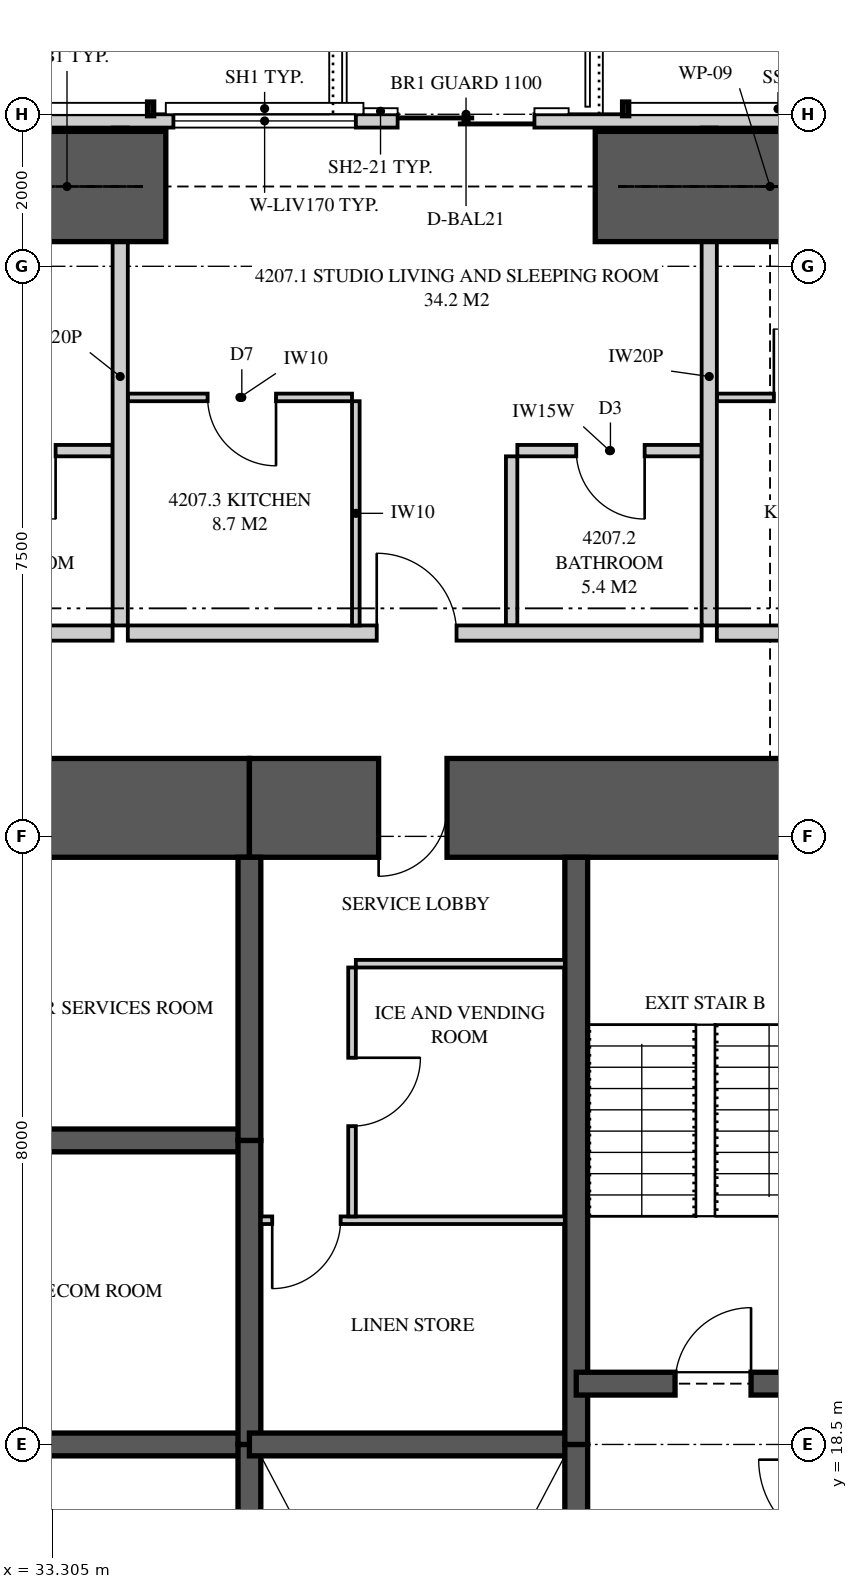
"""IFC4 building model, lengths in metres.
Left out: names, types, materials, properties, quantities, classifications, styles, units other than length and angle.
Written with IfcOpenShell. Run it as: python <this file> out.ifc"""

import sys

from ifc_helpers import new_model, si_unit, direction, frame, frame_2d, origin, place, context, subcontext, project, spatial, polyline, rectangle, outline, extrude, element, fill, save


model = new_model("IFC4")
c1 = context("Model", 3, precision=1e-05, world=origin(), true_north=direction((0.0, 1.0)))
c2 = subcontext(c1, "Body", "Model", "MODEL_VIEW")
j1 = project(units=[si_unit("LENGTHUNIT", "METRE"), si_unit("PLANEANGLEUNIT", "RADIAN")], contexts=[c1])
p1 = place(None, origin())
s1 = spatial("IfcSite", under=j1, at=p1, CompositionType="ELEMENT")
p2 = place(p1, origin())
s2 = spatial("IfcBuilding", under=s1, at=p2, CompositionType="ELEMENT")
p3 = place(p2, frame((0.0, 0.0, 157.7)))
s3 = spatial("IfcBuildingStorey", under=s2, at=p3, CompositionType="ELEMENT", Elevation=157.7)
p4 = place(p3, frame((44.15, 26.875, 0.0), z_axis=(0.0, 0.0, 1.0), x_axis=(-1.0, 0.0, 0.0)))
e1 = element("IfcWall", 1, at=p4, inside=s3, PredefinedType="SHEAR", context=c2, shape_type="SweptSolid", body=[
    extrude(rectangle(XDim=8.25, YDim=1.3, at=frame_2d((4.125, 0.0))), origin(), (0.0, 0.0, 1.0), 3.35),
])
p5 = place(p4, frame((5.65, 0.0, 0.0)))
e2 = element("IfcOpeningElement", 2, at=p5, cuts=e1, PredefinedType="OPENING", context=c2, shape_type="SweptSolid", body=[
    extrude(rectangle(XDim=0.9, YDim=2.1, at=frame_2d((0.45, 1.05))), frame((0.0, 0.66, 0.0), z_axis=(0.0, -1.0, 0.0), x_axis=(1.0, 0.0, 0.0)), (0.0, 0.0, 1.0), 1.32),
])
p6 = place(p3, frame((35.9, 26.875, 0.0), z_axis=(0.0, 0.0, 1.0), x_axis=(-1.0, 0.0, 0.0)))
e3 = element("IfcWall", 3, at=p6, inside=s3, PredefinedType="SHEAR", context=c2, shape_type="SweptSolid", body=[
    extrude(rectangle(XDim=4.3, YDim=1.3, at=frame_2d((2.15, 0.0))), origin(), (0.0, 0.0, 1.0), 3.35),
])
for number, where, z_axis, x_axis in (
    (4, (35.9, 14.5, 0.0), (0.0, 0.0, 1.0), (0.0, 1.0, 0.0)),
    (5, (35.9, 18.5, 0.0), (0.0, 0.0, 1.0), (0.0, 1.0, 0.0)),
):
    element("IfcWall", number, at=place(p3, frame(where, z_axis=z_axis, x_axis=x_axis)), inside=s3, PredefinedType="SHEAR", context=c2, shape_type="SweptSolid", body=[
        extrude(rectangle(XDim=4.0, YDim=0.3, at=frame_2d((2.0, 0.0))), origin(), (0.0, 0.0, 1.0), 3.35),
    ])
p7 = place(p3, frame((35.9, 22.5, 0.0), z_axis=(0.0, 0.0, 1.0), x_axis=(0.0, 1.0, 0.0)))
e6 = element("IfcWall", 6, at=p7, inside=s3, PredefinedType="SHEAR", context=c2, shape_type="SweptSolid", body=[
    extrude(rectangle(XDim=3.725, YDim=0.3, at=frame_2d((1.863, 0.0))), origin(), (0.0, 0.0, 1.0), 3.35),
])
p8 = place(p3, frame((40.2, 13.7, 0.0), z_axis=(0.0, 0.0, 1.0), x_axis=(0.0, 1.0, 0.0)))
e7 = element("IfcWall", 7, at=p8, inside=s3, PredefinedType="SHEAR", context=c2, shape_type="SweptSolid", body=[
    extrude(rectangle(XDim=4.8, YDim=0.3, at=frame_2d((2.4, 0.0))), origin(), (0.0, 0.0, 1.0), 3.35),
])
p9 = place(p3, frame((40.2, 18.5, 0.0), z_axis=(0.0, 0.0, 1.0), x_axis=(0.0, 1.0, 0.0)))
e8 = element("IfcWall", 8, at=p9, inside=s3, PredefinedType="SHEAR", context=c2, shape_type="SweptSolid", body=[
    extrude(rectangle(XDim=7.725, YDim=0.3, at=frame_2d((3.863, 0.0))), origin(), (0.0, 0.0, 1.0), 3.35),
])
for number, where, z_axis, x_axis in (
    (9, (31.6, 18.5, 0.0), (0.0, 0.0, 1.0), (1.0, 0.0, 0.0)),
    (10, (31.6, 22.5, 0.0), (0.0, 0.0, 1.0), (1.0, 0.0, 0.0)),
):
    element("IfcWall", number, at=place(p3, frame(where, z_axis=z_axis, x_axis=x_axis)), inside=s3, PredefinedType="SHEAR", context=c2, shape_type="SweptSolid", body=[
        extrude(rectangle(XDim=4.3, YDim=0.3, at=frame_2d((2.15, 0.0))), origin(), (0.0, 0.0, 1.0), 3.35),
    ])
p10 = place(p3, frame((35.9, 18.5, 0.0), z_axis=(0.0, 0.0, 1.0), x_axis=(1.0, 0.0, 0.0)))
e11 = element("IfcWall", 11, at=p10, inside=s3, PredefinedType="SHEAR", context=c2, shape_type="SweptSolid", body=[
    extrude(rectangle(XDim=4.3, YDim=0.3, at=frame_2d((2.15, 0.0))), origin(), (0.0, 0.0, 1.0), 3.35),
])
p11 = place(p3, frame((40.2, 19.3, 0.0), z_axis=(0.0, 0.0, 1.0), x_axis=(1.0, 0.0, 0.0)))
e12 = element("IfcWall", 12, at=p11, inside=s3, PredefinedType="SHEAR", context=c2, shape_type="SweptSolid", body=[
    extrude(rectangle(XDim=3.6, YDim=0.3, at=frame_2d((1.8, 0.0))), origin(), (0.0, 0.0, 1.0), 3.35),
])
p12 = place(p11, frame((1.3, 0.0, 0.0)))
e13 = element("IfcOpeningElement", 13, at=p12, cuts=e12, PredefinedType="OPENING", context=c2, shape_type="SweptSolid", body=[
    extrude(rectangle(XDim=1.0, YDim=2.1, at=frame_2d((0.5, 1.05))), frame((0.0, 0.16, 0.0), z_axis=(0.0, -1.0, 0.0), x_axis=(1.0, 0.0, 0.0)), (0.0, 0.0, 1.0), 0.32),
])
p13 = place(p3, frame((49.949, 35.913, 0.0), z_axis=(0.0, 0.0, 1.0), x_axis=(-1.0, 0.0, 0.0)))
e14 = element("IfcWall", 14, at=p13, inside=s3, PredefinedType="SOLIDWALL", context=c2, shape_type="SweptSolid", body=[
    extrude(outline(polyline([(0.0, 0.0), (34.897, 0.0), (34.897, 3.11), (27.91, 3.11), (27.91, 2.15), (27.836, 2.15), (27.836, 3.11), (27.699, 3.11), (27.699, 2.15), (7.199, 2.15), (7.199, 3.11), (7.062, 3.11), (7.062, 2.15), (6.987, 2.15), (6.987, 3.11), (0.0, 3.11), (0.0, 0.0)])), frame((0.0, 0.087, 0.0), z_axis=(0.0, -1.0, 0.0), x_axis=(1.0, 0.0, 0.0)), (0.0, 0.0, 1.0), 0.175),
])
p14 = place(p13, frame((2.389, 0.0, 0.4)))
e15 = element("IfcOpeningElement", 15, at=p14, cuts=e14, PredefinedType="OPENING", context=c2, shape_type="SweptSolid", body=[
    extrude(rectangle(XDim=2.4, YDim=1.7, at=frame_2d((1.2, 0.85))), frame((0.0, 0.097, 0.0), z_axis=(0.0, -1.0, 0.0), x_axis=(1.0, 0.0, 0.0)), (0.0, 0.0, 1.0), 0.195),
])
p15 = place(p13, frame((10.299, 0.0, 0.0)))
e16 = element("IfcOpeningElement", 16, at=p15, cuts=e14, PredefinedType="OPENING", context=c2, shape_type="SweptSolid", body=[
    extrude(rectangle(XDim=1.8, YDim=2.1, at=frame_2d((0.9, 1.05))), frame((0.0, 0.097, 0.0), z_axis=(0.0, -1.0, 0.0), x_axis=(1.0, 0.0, 0.0)), (0.0, 0.0, 1.0), 0.195),
])
p16 = place(p13, frame((12.649, 0.0, 0.4)))
e17 = element("IfcOpeningElement", 17, at=p16, cuts=e14, PredefinedType="OPENING", context=c2, shape_type="SweptSolid", body=[
    extrude(rectangle(XDim=2.4, YDim=1.7, at=frame_2d((1.2, 0.85))), frame((0.0, 0.097, 0.0), z_axis=(0.0, -1.0, 0.0), x_axis=(1.0, 0.0, 0.0)), (0.0, 0.0, 1.0), 0.195),
])
p17 = place(p13, frame((22.699, 0.0, 0.0)))
e18 = element("IfcOpeningElement", 18, at=p17, cuts=e14, PredefinedType="OPENING", context=c2, shape_type="SweptSolid", body=[
    extrude(rectangle(XDim=1.8, YDim=2.1, at=frame_2d((0.9, 1.05))), frame((0.0, 0.097, 0.0), z_axis=(0.0, -1.0, 0.0), x_axis=(1.0, 0.0, 0.0)), (0.0, 0.0, 1.0), 0.195),
])
p18 = place(p13, frame((19.849, 0.0, 0.4)))
e19 = element("IfcOpeningElement", 19, at=p18, cuts=e14, PredefinedType="OPENING", context=c2, shape_type="SweptSolid", body=[
    extrude(rectangle(XDim=2.4, YDim=1.7, at=frame_2d((1.2, 0.85))), frame((0.0, 0.097, 0.0), z_axis=(0.0, -1.0, 0.0), x_axis=(1.0, 0.0, 0.0)), (0.0, 0.0, 1.0), 0.195),
])
p19 = place(p13, frame((30.973, 0.0, 0.4)))
e20 = element("IfcOpeningElement", 20, at=p19, cuts=e14, PredefinedType="OPENING", context=c2, shape_type="SweptSolid", body=[
    extrude(rectangle(XDim=2.4, YDim=1.7, at=frame_2d((1.2, 0.85))), frame((0.0, 0.097, 0.0), z_axis=(0.0, -1.0, 0.0), x_axis=(1.0, 0.0, 0.0)), (0.0, 0.0, 1.0), 0.195),
])
p20 = place(p3, frame((34.2, 35.825, 0.0), z_axis=(0.0, 0.0, 1.0), x_axis=(0.0, -1.0, 0.0)))
e21 = element("IfcWall", 21, at=p20, inside=s3, PredefinedType="PARTITIONING", context=c2, shape_type="SweptSolid", body=[
    extrude(outline(polyline([(0.529, 2.15), (0.0, 2.15), (0.0, 0.0), (0.529, 0.0), (0.529, 0.123), (1.021, 0.123), (1.021, 0.0), (6.55, 0.0), (6.55, 3.11), (1.685, 3.11), (1.685, 2.15), (1.021, 2.15), (1.021, 2.027), (0.529, 2.027), (0.529, 2.15)])), frame((0.0, 0.1, 0.0), z_axis=(0.0, -1.0, 0.0), x_axis=(1.0, 0.0, 0.0)), (0.0, 0.0, 1.0), 0.2),
])
p21 = place(p3, frame((31.675, 31.575, 0.0), z_axis=(0.0, 0.0, 1.0), x_axis=(1.0, 0.0, 0.0)))
e22 = element("IfcWall", 22, at=p21, inside=s3, PredefinedType="PLUMBINGWALL", context=c2, shape_type="SweptSolid", body=[
    extrude(outline(polyline([(0.0, 0.0), (2.425, 0.0), (2.425, 3.11), (1.146, 3.11), (1.146, 2.531), (0.504, 2.531), (0.504, 3.11), (0.0, 3.11), (0.0, 0.0)])), frame((0.0, 0.075, 0.0), z_axis=(0.0, -1.0, 0.0), x_axis=(1.0, 0.0, 0.0)), (0.0, 0.0, 1.0), 0.15),
])
p22 = place(p21, frame((0.775, 0.0, 0.0)))
e23 = element("IfcOpeningElement", 23, at=p22, cuts=e22, PredefinedType="OPENING", context=c2, shape_type="SweptSolid", body=[
    extrude(rectangle(XDim=0.9, YDim=2.1, at=frame_2d((0.45, 1.05))), frame((0.0, 0.085, 0.0), z_axis=(0.0, -1.0, 0.0), x_axis=(1.0, 0.0, 0.0)), (0.0, 0.0, 1.0), 0.17),
])
p23 = place(p3, frame((41.95, 35.825, 0.0), z_axis=(0.0, 0.0, 1.0), x_axis=(0.0, -1.0, 0.0)))
e24 = element("IfcWall", 24, at=p23, inside=s3, PredefinedType="PARTITIONING", context=c2, shape_type="SweptSolid", body=[
    extrude(outline(polyline([(0.529, 2.15), (0.0, 2.15), (0.0, 0.0), (0.529, 0.0), (0.529, 0.876), (1.021, 0.876), (1.021, 0.0), (6.55, 0.0), (6.55, 3.11), (1.685, 3.11), (1.685, 2.15), (1.021, 2.15), (1.021, 1.274), (0.529, 1.274), (0.529, 2.15)])), frame((0.0, 0.1, 0.0), z_axis=(0.0, -1.0, 0.0), x_axis=(1.0, 0.0, 0.0)), (0.0, 0.0, 1.0), 0.2),
])
p24 = place(p3, frame((34.3, 29.175, 0.0), z_axis=(0.0, 0.0, 1.0), x_axis=(1.0, 0.0, 0.0)))
e25 = element("IfcWall", 25, at=p24, inside=s3, PredefinedType="PARTITIONING", context=c2, shape_type="SweptSolid", body=[
    extrude(rectangle(XDim=7.55, YDim=0.2, at=frame_2d((3.775, 0.0))), origin(), (0.0, 0.0, 1.0), 3.11),
])
p25 = place(p24, frame((3.275, 0.0, 0.0)))
e26 = element("IfcOpeningElement", 26, at=p25, cuts=e25, PredefinedType="OPENING", context=c2, shape_type="SweptSolid", body=[
    extrude(rectangle(XDim=1.05, YDim=2.2, at=frame_2d((0.525, 1.1))), frame((0.0, 0.11, 0.0), z_axis=(0.0, -1.0, 0.0), x_axis=(1.0, 0.0, 0.0)), (0.0, 0.0, 1.0), 0.22),
])
p26 = place(p3, frame((39.425, 31.575, 0.0), z_axis=(0.0, 0.0, 1.0), x_axis=(1.0, 0.0, 0.0)))
e27 = element("IfcWall", 27, at=p26, inside=s3, PredefinedType="PLUMBINGWALL", context=c2, shape_type="SweptSolid", body=[
    extrude(rectangle(XDim=2.425, YDim=0.15, at=frame_2d((1.212, 0.0))), origin(), (0.0, 0.0, 1.0), 3.11),
])
p27 = place(p26, frame((0.775, 0.0, 0.0)))
e28 = element("IfcOpeningElement", 28, at=p27, cuts=e27, PredefinedType="OPENING", context=c2, shape_type="SweptSolid", body=[
    extrude(rectangle(XDim=0.9, YDim=2.1, at=frame_2d((0.45, 1.05))), frame((0.0, 0.085, 0.0), z_axis=(0.0, -1.0, 0.0), x_axis=(1.0, 0.0, 0.0)), (0.0, 0.0, 1.0), 0.17),
])
p28 = place(p3, frame((39.35, 31.5, 0.0), z_axis=(0.0, 0.0, 1.0), x_axis=(0.0, -1.0, 0.0)))
e29 = element("IfcWall", 29, at=p28, inside=s3, PredefinedType="PLUMBINGWALL", context=c2, shape_type="SweptSolid", body=[
    extrude(rectangle(XDim=2.225, YDim=0.15, at=frame_2d((1.113, 0.0))), origin(), (0.0, 0.0, 1.0), 3.11),
])
p29 = place(p3, frame((34.3, 32.275, 0.0), z_axis=(0.0, 0.0, 1.0), x_axis=(1.0, 0.0, 0.0)))
e30 = element("IfcWall", 30, at=p29, inside=s3, PredefinedType="PARTITIONING", context=c2, shape_type="SweptSolid", body=[
    extrude(rectangle(XDim=2.95, YDim=0.1, at=frame_2d((1.475, 0.0))), origin(), (0.0, 0.0, 1.0), 3.11),
])
p30 = place(p29, frame((1.05, 0.0, 0.0)))
e31 = element("IfcOpeningElement", 31, at=p30, cuts=e30, PredefinedType="OPENING", context=c2, shape_type="SweptSolid", body=[
    extrude(rectangle(XDim=0.9, YDim=2.1, at=frame_2d((0.45, 1.05))), frame((0.0, 0.06, 0.0), z_axis=(0.0, -1.0, 0.0), x_axis=(1.0, 0.0, 0.0)), (0.0, 0.0, 1.0), 0.12),
])
p31 = place(p3, frame((37.3, 32.225, 0.0), z_axis=(0.0, 0.0, 1.0), x_axis=(0.0, -1.0, 0.0)))
e32 = element("IfcWall", 32, at=p31, inside=s3, PredefinedType="PARTITIONING", context=c2, shape_type="SweptSolid", body=[
    extrude(rectangle(XDim=2.95, YDim=0.1, at=frame_2d((1.475, 0.0))), origin(), (0.0, 0.0, 1.0), 3.11),
])
p32 = place(p3, frame((42.05, 29.175, 0.0), z_axis=(0.0, 0.0, 1.0), x_axis=(1.0, 0.0, 0.0)))
e33 = element("IfcWall", 33, at=p32, inside=s3, PredefinedType="PARTITIONING", context=c2, shape_type="SweptSolid", body=[
    extrude(outline(polyline([(0.0, 0.0), (3.9, 0.0), (3.9, 3.11), (1.046, 3.11), (1.046, 2.531), (0.354, 2.531), (0.354, 3.11), (0.0, 3.11), (0.0, 0.0)])), frame((0.0, 0.1, 0.0), z_axis=(0.0, -1.0, 0.0), x_axis=(1.0, 0.0, 0.0)), (0.0, 0.0, 1.0), 0.2),
])
p33 = place(p32, frame((2.7, 0.0, 0.0)))
e34 = element("IfcOpeningElement", 34, at=p33, cuts=e33, PredefinedType="OPENING", context=c2, shape_type="SweptSolid", body=[
    extrude(rectangle(XDim=1.05, YDim=2.2, at=frame_2d((0.525, 1.1))), frame((0.0, 0.11, 0.0), z_axis=(0.0, -1.0, 0.0), x_axis=(1.0, 0.0, 0.0)), (0.0, 0.0, 1.0), 0.22),
])
p34 = place(p3, frame((42.05, 32.275, 0.0), z_axis=(0.0, 0.0, 1.0), x_axis=(1.0, 0.0, 0.0)))
e35 = element("IfcWall", 35, at=p34, inside=s3, PredefinedType="PARTITIONING", context=c2, shape_type="SweptSolid", body=[
    extrude(outline(polyline([(0.0, 0.0), (2.35, 0.0), (2.35, 3.11), (0.996, 3.11), (0.996, 2.531), (0.404, 2.531), (0.404, 3.11), (0.0, 3.11), (0.0, 0.0)])), frame((0.0, 0.05, 0.0), z_axis=(0.0, -1.0, 0.0), x_axis=(1.0, 0.0, 0.0)), (0.0, 0.0, 1.0), 0.1),
])
p35 = place(p34, frame((0.75, 0.0, 0.0)))
e36 = element("IfcOpeningElement", 36, at=p35, cuts=e35, PredefinedType="OPENING", context=c2, shape_type="SweptSolid", body=[
    extrude(rectangle(XDim=0.9, YDim=2.1, at=frame_2d((0.45, 1.05))), frame((0.0, 0.06, 0.0), z_axis=(0.0, -1.0, 0.0), x_axis=(1.0, 0.0, 0.0)), (0.0, 0.0, 1.0), 0.12),
])
p36 = place(p3, frame((28.8, 29.175, 0.0), z_axis=(0.0, 0.0, 1.0), x_axis=(1.0, 0.0, 0.0)))
e37 = element("IfcWall", 37, at=p36, inside=s3, PredefinedType="PARTITIONING", context=c2, shape_type="SweptSolid", body=[
    extrude(outline(polyline([(0.0, 0.0), (5.3, 0.0), (5.3, 3.11), (4.046, 3.11), (4.046, 2.531), (3.354, 2.531), (3.354, 3.11), (0.0, 3.11), (0.0, 0.0)])), frame((0.0, 0.1, 0.0), z_axis=(0.0, -1.0, 0.0), x_axis=(1.0, 0.0, 0.0)), (0.0, 0.0, 1.0), 0.2),
])
p37 = place(p3, frame((37.3, 24.825, 0.0), z_axis=(0.0, 0.0, 1.0), x_axis=(1.0, 0.0, 0.0)))
e38 = element("IfcWall", 38, at=p37, inside=s3, PredefinedType="PARTITIONING", context=c2, shape_type="SweptSolid", body=[
    extrude(rectangle(XDim=2.75, YDim=0.1, at=frame_2d((1.375, 0.0))), origin(), (0.0, 0.0, 1.0), 3.11),
])
p38 = place(p3, frame((37.25, 21.5, 0.0), z_axis=(0.0, 0.0, 1.0), x_axis=(0.0, 1.0, 0.0)))
e39 = element("IfcWall", 39, at=p38, inside=s3, PredefinedType="PARTITIONING", context=c2, shape_type="SweptSolid", body=[
    extrude(rectangle(XDim=3.275, YDim=0.1, at=frame_2d((1.637, 0.0))), origin(), (0.0, 0.0, 1.0), 3.11),
])
p39 = place(p38, frame((1.188, 0.0, 0.0)))
e40 = element("IfcOpeningElement", 40, at=p39, cuts=e39, PredefinedType="OPENING", context=c2, shape_type="SweptSolid", body=[
    extrude(rectangle(XDim=0.9, YDim=2.1, at=frame_2d((0.45, 1.05))), frame((0.0, 0.06, 0.0), z_axis=(0.0, -1.0, 0.0), x_axis=(1.0, 0.0, 0.0)), (0.0, 0.0, 1.0), 0.12),
])
p40 = place(p3, frame((36.05, 21.45, 0.0), z_axis=(0.0, 0.0, 1.0), x_axis=(1.0, 0.0, 0.0)))
e41 = element("IfcWall", 41, at=p40, inside=s3, PredefinedType="PARTITIONING", context=c2, shape_type="SweptSolid", body=[
    extrude(rectangle(XDim=4.0, YDim=0.1, at=frame_2d((2.0, 0.0))), origin(), (0.0, 0.0, 1.0), 3.11),
])
p41 = place(p40, frame((0.15, 0.0, 0.0)))
e42 = element("IfcOpeningElement", 42, at=p41, cuts=e41, PredefinedType="OPENING", context=c2, shape_type="SweptSolid", body=[
    extrude(rectangle(XDim=0.9, YDim=2.1, at=frame_2d((0.45, 1.05))), frame((0.0, 0.06, 0.0), z_axis=(0.0, -1.0, 0.0), x_axis=(1.0, 0.0, 0.0)), (0.0, 0.0, 1.0), 0.12),
])
for number, where, z_axis, x_axis in (
    (43, (40.45, 35.05, 0.0), (0.0, 0.0, 1.0), (1.0, 0.0, 0.0)),
    (44, (30.2, 35.05, 0.0), (0.0, 0.0, 1.0), (1.0, 0.0, 0.0)),
):
    element("IfcWall", number, at=place(p3, frame(where, z_axis=z_axis, x_axis=x_axis)), inside=s3, PredefinedType="SHEAR", context=c2, shape_type="SweptSolid", body=[
        extrude(rectangle(XDim=4.6, YDim=1.45, at=frame_2d((2.3, 0.0))), origin(), (0.0, 0.0, 1.0), 3.35),
    ])
p42 = place(p15, origin())
e45 = element("IfcDoor", 45, at=p42, inside=s3, OperationType="SLIDING_TO_LEFT", PredefinedType="DOOR", context=c2, shape_type="SweptSolid", body=[
    extrude(rectangle(XDim=1.8, YDim=2.1, at=frame_2d((0.9, 1.05))), frame((0.0, 0.025, 0.0), z_axis=(0.0, -1.0, 0.0), x_axis=(1.0, 0.0, 0.0)), (0.0, 0.0, 1.0), 0.05),
])
fill(e16, e45)
p43 = place(p16, origin())
e46 = element("IfcWindow", 46, at=p43, inside=s3, PartitioningType="SINGLE_PANEL", PredefinedType="WINDOW", context=c2, shape_type="SweptSolid", body=[
    extrude(rectangle(XDim=2.4, YDim=1.7, at=frame_2d((1.2, 0.85))), frame((0.0, 0.03, 0.0), z_axis=(0.0, -1.0, 0.0), x_axis=(1.0, 0.0, 0.0)), (0.0, 0.0, 1.0), 0.06),
])
fill(e17, e46)
p44 = place(p22, frame((0.9, 0.0, 0.0), z_axis=(0.0, 0.0, 1.0), x_axis=(-1.0, 0.0, 0.0)))
e47 = element("IfcDoor", 47, at=p44, inside=s3, OperationType="SINGLE_SWING_LEFT", PredefinedType="DOOR", context=c2, shape_type="SweptSolid", body=[
    extrude(rectangle(XDim=0.9, YDim=2.1, at=frame_2d((0.45, 1.05))), frame((0.0, 0.025, 0.0), z_axis=(0.0, -1.0, 0.0), x_axis=(1.0, 0.0, 0.0)), (0.0, 0.0, 1.0), 0.05),
])
fill(e23, e47)
p45 = place(p25, origin())
e48 = element("IfcDoor", 48, at=p45, inside=s3, OperationType="SINGLE_SWING_LEFT", PredefinedType="DOOR", context=c2, shape_type="SweptSolid", body=[
    extrude(rectangle(XDim=1.05, YDim=2.2, at=frame_2d((0.525, 1.1))), frame((0.0, 0.025, 0.0), z_axis=(0.0, -1.0, 0.0), x_axis=(1.0, 0.0, 0.0)), (0.0, 0.0, 1.0), 0.05),
])
fill(e26, e48)
p46 = place(p27, frame((0.9, 0.0, 0.0), z_axis=(0.0, 0.0, 1.0), x_axis=(-1.0, 0.0, 0.0)))
e49 = element("IfcDoor", 49, at=p46, inside=s3, OperationType="SINGLE_SWING_LEFT", PredefinedType="DOOR", context=c2, shape_type="SweptSolid", body=[
    extrude(rectangle(XDim=0.9, YDim=2.1, at=frame_2d((0.45, 1.05))), frame((0.0, 0.025, 0.0), z_axis=(0.0, -1.0, 0.0), x_axis=(1.0, 0.0, 0.0)), (0.0, 0.0, 1.0), 0.05),
])
fill(e28, e49)
p47 = place(p30, frame((0.9, 0.0, 0.0), z_axis=(0.0, 0.0, 1.0), x_axis=(-1.0, 0.0, 0.0)))
e50 = element("IfcDoor", 50, at=p47, inside=s3, OperationType="SINGLE_SWING_LEFT", PredefinedType="DOOR", context=c2, shape_type="SweptSolid", body=[
    extrude(rectangle(XDim=0.9, YDim=2.1, at=frame_2d((0.45, 1.05))), frame((0.0, 0.025, 0.0), z_axis=(0.0, -1.0, 0.0), x_axis=(1.0, 0.0, 0.0)), (0.0, 0.0, 1.0), 0.05),
])
fill(e31, e50)
p48 = place(p35, origin())
e51 = element("IfcDoor", 51, at=p48, inside=s3, OperationType="SINGLE_SWING_LEFT", PredefinedType="DOOR", context=c2, shape_type="SweptSolid", body=[
    extrude(rectangle(XDim=0.9, YDim=2.1, at=frame_2d((0.45, 1.05))), frame((0.0, 0.025, 0.0), z_axis=(0.0, -1.0, 0.0), x_axis=(1.0, 0.0, 0.0)), (0.0, 0.0, 1.0), 0.05),
])
fill(e36, e51)
p49 = place(p39, frame((0.9, 0.0, 0.0), z_axis=(0.0, 0.0, 1.0), x_axis=(-1.0, 0.0, 0.0)))
e52 = element("IfcDoor", 52, at=p49, inside=s3, OperationType="SINGLE_SWING_LEFT", PredefinedType="DOOR", context=c2, shape_type="SweptSolid", body=[
    extrude(rectangle(XDim=0.9, YDim=2.1, at=frame_2d((0.45, 1.05))), frame((0.0, 0.025, 0.0), z_axis=(0.0, -1.0, 0.0), x_axis=(1.0, 0.0, 0.0)), (0.0, 0.0, 1.0), 0.05),
])
fill(e40, e52)
p50 = place(p41, frame((0.9, 0.0, 0.0), z_axis=(0.0, 0.0, 1.0), x_axis=(-1.0, 0.0, 0.0)))
e53 = element("IfcDoor", 53, at=p50, inside=s3, OperationType="SINGLE_SWING_RIGHT", PredefinedType="DOOR", context=c2, shape_type="SweptSolid", body=[
    extrude(rectangle(XDim=0.9, YDim=2.1, at=frame_2d((0.45, 1.05))), frame((0.0, 0.025, 0.0), z_axis=(0.0, -1.0, 0.0), x_axis=(1.0, 0.0, 0.0)), (0.0, 0.0, 1.0), 0.05),
])
fill(e42, e53)
p51 = place(p12, origin())
e54 = element("IfcDoor", 54, at=p51, inside=s3, OperationType="SINGLE_SWING_RIGHT", PredefinedType="DOOR", context=c2, shape_type="SweptSolid", body=[
    extrude(rectangle(XDim=1.0, YDim=2.1, at=frame_2d((0.5, 1.05))), frame((0.0, 0.025, 0.0), z_axis=(0.0, -1.0, 0.0), x_axis=(1.0, 0.0, 0.0)), (0.0, 0.0, 1.0), 0.05),
])
fill(e13, e54)
p52 = place(p5, origin())
e55 = element("IfcDoor", 55, at=p52, inside=s3, OperationType="SINGLE_SWING_RIGHT", PredefinedType="DOOR", context=c2, shape_type="SweptSolid", body=[
    extrude(rectangle(XDim=0.9, YDim=2.1, at=frame_2d((0.45, 1.05))), frame((0.0, 0.47, 0.0), z_axis=(0.0, -1.0, 0.0), x_axis=(1.0, 0.0, 0.0)), (0.0, 0.0, 1.0), 0.8),
])
fill(e2, e55)
save(model, sys.argv[1])
